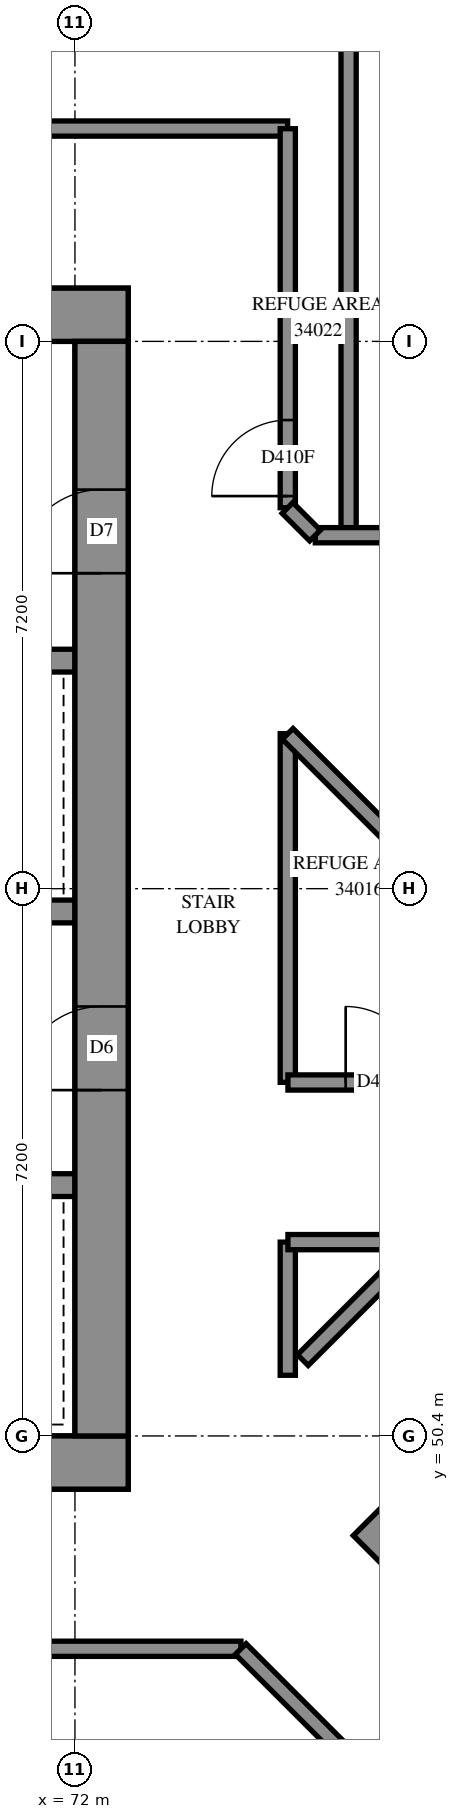
"""IFC4 building model, lengths in metres.
Left out: names, types, materials, properties, quantities, classifications, styles, units other than length and angle.
Written with IfcOpenShell. Run it as: python <this file> out.ifc"""

import sys

from ifc_helpers import new_model, si_unit, direction, frame, frame_2d, origin, place, context, subcontext, project, spatial, rectangle, extrude, element, fill, save


model = new_model("IFC4")
c1 = context("Model", 3, precision=1e-05, world=origin(), true_north=direction((0.0, 1.0)))
c2 = subcontext(c1, "Body", "Model", "MODEL_VIEW")
j1 = project(units=[si_unit("LENGTHUNIT", "METRE"), si_unit("PLANEANGLEUNIT", "RADIAN")], contexts=[c1])
p1 = place(None, origin())
s1 = spatial("IfcSite", under=j1, at=p1, CompositionType="ELEMENT")
p2 = place(p1, origin())
s2 = spatial("IfcBuilding", under=s1, at=p2, CompositionType="ELEMENT")
p3 = place(p2, frame((0.0, 0.0, 126.2)))
s3 = spatial("IfcBuildingStorey", under=s2, at=p3, CompositionType="ELEMENT", Elevation=126.2)
p4 = place(p3, frame((56.9, 50.05, -0.3), z_axis=(0.0, 0.0, 1.0), x_axis=(1.0, 0.0, 0.0)))
e1 = element("IfcWall", 1, at=p4, inside=s3, PredefinedType="SHEAR", context=c2, shape_type="SweptSolid", body=[
    extrude(rectangle(XDim=15.8, YDim=0.7, at=frame_2d((7.9, 0.0))), origin(), (0.0, 0.0, 1.0), 4.3),
])
p5 = place(p3, frame((56.9, 65.15, -0.3), z_axis=(0.0, 0.0, 1.0), x_axis=(1.0, 0.0, 0.0)))
e2 = element("IfcWall", 2, at=p5, inside=s3, PredefinedType="SHEAR", context=c2, shape_type="SweptSolid", body=[
    extrude(rectangle(XDim=15.8, YDim=0.7, at=frame_2d((7.9, 0.0))), origin(), (0.0, 0.0, 1.0), 4.3),
])
p6 = place(p5, frame((10.7, 0.0, 0.3)))
e3 = element("IfcOpeningElement", 3, at=p6, cuts=e2, PredefinedType="OPENING", context=c2, shape_type="SweptSolid", body=[
    extrude(rectangle(XDim=0.8, YDim=2.1, at=frame_2d((0.4, 1.05))), frame((0.0, 0.36, 0.0), z_axis=(0.0, -1.0, 0.0), x_axis=(1.0, 0.0, 0.0)), (0.0, 0.0, 1.0), 0.72),
])
p7 = place(p3, frame((72.35, 50.4, -0.3), z_axis=(0.0, 0.0, 1.0), x_axis=(0.0, 1.0, 0.0)))
e4 = element("IfcWall", 4, at=p7, inside=s3, PredefinedType="SHEAR", context=c2, shape_type="SweptSolid", body=[
    extrude(rectangle(XDim=14.4, YDim=0.7, at=frame_2d((7.2, 0.0))), origin(), (0.0, 0.0, 1.0), 4.3),
])
p8 = place(p7, frame((4.55, 0.0, 0.3)))
e5 = element("IfcOpeningElement", 5, at=p8, cuts=e4, PredefinedType="OPENING", context=c2, shape_type="SweptSolid", body=[
    extrude(rectangle(XDim=1.1, YDim=2.1, at=frame_2d((0.55, 1.05))), frame((0.0, 0.36, 0.0), z_axis=(0.0, -1.0, 0.0), x_axis=(1.0, 0.0, 0.0)), (0.0, 0.0, 1.0), 0.72),
])
p9 = place(p7, frame((11.35, 0.0, 0.3)))
e6 = element("IfcOpeningElement", 6, at=p9, cuts=e4, PredefinedType="OPENING", context=c2, shape_type="SweptSolid", body=[
    extrude(rectangle(XDim=1.1, YDim=2.1, at=frame_2d((0.55, 1.05))), frame((0.0, 0.36, 0.0), z_axis=(0.0, -1.0, 0.0), x_axis=(1.0, 0.0, 0.0)), (0.0, 0.0, 1.0), 0.72),
])
p10 = place(p3, frame((57.6, 53.7, 0.0), z_axis=(0.0, 0.0, 1.0), x_axis=(1.0, 0.0, 0.0)))
e7 = element("IfcWall", 7, at=p10, inside=s3, PredefinedType="SOLIDWALL", context=c2, shape_type="SweptSolid", body=[
    extrude(rectangle(XDim=14.4, YDim=0.3, at=frame_2d((7.2, 0.0))), origin(), (0.0, 0.0, 1.0), 4.7),
])
p11 = place(p10, frame((1.25, 0.0, 0.0)))
e8 = element("IfcOpeningElement", 8, at=p11, cuts=e7, PredefinedType="OPENING", context=c2, shape_type="SweptSolid", body=[
    extrude(rectangle(XDim=1.1, YDim=2.1, at=frame_2d((0.55, 1.05))), frame((0.0, 0.16, 0.0), z_axis=(0.0, -1.0, 0.0), x_axis=(1.0, 0.0, 0.0)), (0.0, 0.0, 1.0), 0.32),
])
p12 = place(p10, frame((4.85, 0.0, 0.0)))
e9 = element("IfcOpeningElement", 9, at=p12, cuts=e7, PredefinedType="OPENING", context=c2, shape_type="SweptSolid", body=[
    extrude(rectangle(XDim=1.1, YDim=2.1, at=frame_2d((0.55, 1.05))), frame((0.0, 0.16, 0.0), z_axis=(0.0, -1.0, 0.0), x_axis=(1.0, 0.0, 0.0)), (0.0, 0.0, 1.0), 0.32),
])
p13 = place(p10, frame((8.45, 0.0, 0.0)))
e10 = element("IfcOpeningElement", 10, at=p13, cuts=e7, PredefinedType="OPENING", context=c2, shape_type="SweptSolid", body=[
    extrude(rectangle(XDim=1.1, YDim=2.1, at=frame_2d((0.55, 1.05))), frame((0.0, 0.16, 0.0), z_axis=(0.0, -1.0, 0.0), x_axis=(1.0, 0.0, 0.0)), (0.0, 0.0, 1.0), 0.32),
])
p14 = place(p10, frame((12.05, 0.0, 0.0)))
e11 = element("IfcOpeningElement", 11, at=p14, cuts=e7, PredefinedType="OPENING", context=c2, shape_type="SweptSolid", body=[
    extrude(rectangle(XDim=1.1, YDim=2.1, at=frame_2d((0.55, 1.05))), frame((0.0, 0.16, 0.0), z_axis=(0.0, -1.0, 0.0), x_axis=(1.0, 0.0, 0.0)), (0.0, 0.0, 1.0), 0.32),
])
p15 = place(p3, frame((57.6, 57.3, 0.0), z_axis=(0.0, 0.0, 1.0), x_axis=(1.0, 0.0, 0.0)))
e12 = element("IfcWall", 12, at=p15, inside=s3, PredefinedType="SOLIDWALL", context=c2, shape_type="SweptSolid", body=[
    extrude(rectangle(XDim=14.4, YDim=0.3, at=frame_2d((7.2, 0.0))), origin(), (0.0, 0.0, 1.0), 4.7),
])
p16 = place(p15, frame((12.05, 0.0, 0.0)))
e13 = element("IfcOpeningElement", 13, at=p16, cuts=e12, PredefinedType="OPENING", context=c2, shape_type="SweptSolid", body=[
    extrude(rectangle(XDim=1.1, YDim=2.1, at=frame_2d((0.55, 1.05))), frame((0.0, 0.16, 0.0), z_axis=(0.0, -1.0, 0.0), x_axis=(1.0, 0.0, 0.0)), (0.0, 0.0, 1.0), 0.32),
])
p17 = place(p3, frame((64.8, 60.6, 0.0), z_axis=(0.0, 0.0, 1.0), x_axis=(1.0, 0.0, 0.0)))
e14 = element("IfcWall", 14, at=p17, inside=s3, PredefinedType="SOLIDWALL", context=c2, shape_type="SweptSolid", body=[
    extrude(rectangle(XDim=7.2, YDim=0.3, at=frame_2d((3.6, 0.0))), origin(), (0.0, 0.0, 1.0), 4.7),
])
p18 = place(p3, frame((75.912, 49.337, -0.3), z_axis=(0.0, 0.0, 1.0), x_axis=(0.7071036166, -0.7071099457, 0.0)))
e15 = element("IfcWall", 15, at=p18, inside=s3, PredefinedType="SHEAR", context=c2, shape_type="SweptSolid", body=[
    extrude(rectangle(XDim=15.8, YDim=0.7, at=frame_2d((7.9, 0.0))), origin(), (0.0, 0.0, 1.0), 4.3),
])
p19 = place(p3, frame((54.8, 67.6, 0.0), z_axis=(0.0, 0.0, 1.0), x_axis=(1.0, 0.0, 0.0)))
e16 = element("IfcWall", 16, at=p19, inside=s3, PredefinedType="PARTITIONING", context=c2, shape_type="SweptSolid", body=[
    extrude(rectangle(XDim=19.998, YDim=0.2, at=frame_2d((9.999, 0.0))), origin(), (0.0, 0.0, 1.0), 4.7),
])
p20 = place(p19, frame((8.738, 0.0, 0.0)))
e17 = element("IfcOpeningElement", 17, at=p20, cuts=e16, PredefinedType="OPENING", context=c2, shape_type="SweptSolid", body=[
    extrude(rectangle(XDim=1.0, YDim=2.1, at=frame_2d((0.5, 1.05))), frame((0.0, 0.11, 0.0), z_axis=(0.0, -1.0, 0.0), x_axis=(1.0, 0.0, 0.0)), (0.0, 0.0, 1.0), 0.22),
])
p21 = place(p3, frame((54.8, 47.6, 0.0), z_axis=(0.0, 0.0, 1.0), x_axis=(1.0, 0.0, 0.0)))
e18 = element("IfcWall", 18, at=p21, inside=s3, PredefinedType="PARTITIONING", context=c2, shape_type="SweptSolid", body=[
    extrude(rectangle(XDim=19.384, YDim=0.2, at=frame_2d((9.692, 0.0))), origin(), (0.0, 0.0, 1.0), 4.7),
])
p22 = place(p21, frame((12.156, 0.0, 0.0)))
e19 = element("IfcOpeningElement", 19, at=p22, cuts=e18, PredefinedType="OPENING", context=c2, shape_type="SweptSolid", body=[
    extrude(rectangle(XDim=1.0, YDim=2.1, at=frame_2d((0.5, 1.05))), frame((0.0, 0.11, 0.0), z_axis=(0.0, -1.0, 0.0), x_axis=(1.0, 0.0, 0.0)), (0.0, 0.0, 1.0), 0.22),
])
p23 = place(p3, frame((75.6, 62.25, 0.0), z_axis=(0.0, 0.0, 1.0), x_axis=(0.0, 1.0, 0.0)))
e20 = element("IfcWall", 20, at=p23, inside=s3, PredefinedType="PARTITIONING", context=c2, shape_type="SweptSolid", body=[
    extrude(rectangle(XDim=6.8, YDim=0.2, at=frame_2d((3.4, 0.0))), origin(), (0.0, 0.0, 1.0), 4.7),
])
p24 = place(p3, frame((74.8, 62.612, 0.0), z_axis=(0.0, 0.0, 1.0), x_axis=(0.0, 1.0, 0.0)))
e21 = element("IfcWall", 21, at=p24, inside=s3, PredefinedType="PARTITIONING", context=c2, shape_type="SweptSolid", body=[
    extrude(rectangle(XDim=4.986, YDim=0.2, at=frame_2d((2.493, 0.0))), origin(), (0.0, 0.0, 1.0), 4.7),
])
p25 = place(p24, frame((0.153, 0.0, 0.0)))
e22 = element("IfcOpeningElement", 22, at=p25, cuts=e21, PredefinedType="OPENING", context=c2, shape_type="SweptSolid", body=[
    extrude(rectangle(XDim=1.0, YDim=2.1, at=frame_2d((0.5, 1.05))), frame((0.0, 0.11, 0.0), z_axis=(0.0, -1.0, 0.0), x_axis=(1.0, 0.0, 0.0)), (0.0, 0.0, 1.0), 0.22),
])
p26 = place(p3, frame((74.8, 55.052, 0.0), z_axis=(0.0, 0.0, 1.0), x_axis=(0.0, 1.0, 0.0)))
e23 = element("IfcWall", 23, at=p26, inside=s3, PredefinedType="PARTITIONING", context=c2, shape_type="SweptSolid", body=[
    extrude(rectangle(XDim=4.588, YDim=0.2, at=frame_2d((2.294, 0.0))), origin(), (0.0, 0.0, 1.0), 4.7),
])
p27 = place(p3, frame((75.162, 62.25, 0.0), z_axis=(0.0, 0.0, 1.0), x_axis=(1.0, 0.0, 0.0)))
e24 = element("IfcWall", 24, at=p27, inside=s3, PredefinedType="PARTITIONING", context=c2, shape_type="SweptSolid", body=[
    extrude(rectangle(XDim=4.038, YDim=0.2, at=frame_2d((2.019, 0.0))), origin(), (0.0, 0.0, 1.0), 4.7),
])
p28 = place(p3, frame((74.802, 55.05, 0.0), z_axis=(0.0, 0.0, 1.0), x_axis=(1.0, 0.0, 0.0)))
e25 = element("IfcWall", 25, at=p28, inside=s3, PredefinedType="PARTITIONING", context=c2, shape_type="SweptSolid", body=[
    extrude(rectangle(XDim=3.852, YDim=0.2, at=frame_2d((1.926, 0.0))), origin(), (0.0, 0.0, 1.0), 4.7),
])
p29 = place(p28, frame((0.759, 0.0, 0.0)))
e26 = element("IfcOpeningElement", 26, at=p29, cuts=e25, PredefinedType="OPENING", context=c2, shape_type="SweptSolid", body=[
    extrude(rectangle(XDim=1.0, YDim=2.1, at=frame_2d((0.5, 1.05))), frame((0.0, 0.11, 0.0), z_axis=(0.0, -1.0, 0.0), x_axis=(1.0, 0.0, 0.0)), (0.0, 0.0, 1.0), 0.22),
])
p30 = place(p3, frame((74.799, 59.637, 0.0), z_axis=(0.0, 0.0, 1.0), x_axis=(0.7071067812, -0.7071067812, 0.0)))
e27 = element("IfcWall", 27, at=p30, inside=s3, PredefinedType="PARTITIONING", context=c2, shape_type="SweptSolid", body=[
    extrude(rectangle(XDim=3.745, YDim=0.2, at=frame_2d((1.872, 0.0))), origin(), (0.0, 0.0, 1.0), 4.7),
])
p31 = place(p3, frame((74.998, 51.398, 0.0), z_axis=(0.0, 0.0, 1.0), x_axis=(0.7075619512, 0.706651318, 0.0)))
e28 = element("IfcWall", 28, at=p31, inside=s3, PredefinedType="PARTITIONING", context=c2, shape_type="SweptSolid", body=[
    extrude(rectangle(XDim=2.196, YDim=0.2, at=frame_2d((1.098, 0.0))), origin(), (0.0, 0.0, 1.0), 4.7),
])
p32 = place(p3, frame((74.181, 47.597, 0.0), z_axis=(0.0, 0.0, 1.0), x_axis=(0.7070823464, -0.7071312152, 0.0)))
e29 = element("IfcWall", 29, at=p32, inside=s3, PredefinedType="PARTITIONING", context=c2, shape_type="SweptSolid", body=[
    extrude(rectangle(XDim=2.046, YDim=0.2, at=frame_2d((1.023, 0.0))), origin(), (0.0, 0.0, 1.0), 4.7),
])
p33 = place(p3, frame((74.8, 51.198, 0.0), z_axis=(0.0, 0.0, 1.0), x_axis=(0.0, 1.0, 0.0)))
e30 = element("IfcWall", 30, at=p33, inside=s3, PredefinedType="PARTITIONING", context=c2, shape_type="SweptSolid", body=[
    extrude(rectangle(XDim=1.752, YDim=0.2, at=frame_2d((0.876, 0.0))), origin(), (0.0, 0.0, 1.0), 4.7),
])
p34 = place(p3, frame((74.802, 52.95, 0.0), z_axis=(0.0, 0.0, 1.0), x_axis=(1.0, 0.0, 0.0)))
e31 = element("IfcWall", 31, at=p34, inside=s3, PredefinedType="PARTITIONING", context=c2, shape_type="SweptSolid", body=[
    extrude(rectangle(XDim=1.75, YDim=0.2, at=frame_2d((0.875, 0.0))), origin(), (0.0, 0.0, 1.0), 4.7),
])
p35 = place(p3, frame((74.796, 62.608, 0.0), z_axis=(0.0, 0.0, 1.0), x_axis=(0.7071067812, -0.7071067812, 0.0)))
e32 = element("IfcWall", 32, at=p35, inside=s3, PredefinedType="PARTITIONING", context=c2, shape_type="SweptSolid", body=[
    extrude(rectangle(XDim=0.512, YDim=0.2, at=frame_2d((0.256, 0.0))), origin(), (0.0, 0.0, 1.0), 4.7),
])
p36 = place(p8, origin())
e33 = element("IfcDoor", 33, at=p36, inside=s3, OperationType="DOUBLE_DOOR_SINGLE_SWING", PredefinedType="DOOR", context=c2, shape_type="SweptSolid", body=[
    extrude(rectangle(XDim=1.1, YDim=2.1, at=frame_2d((0.55, 1.05))), frame((0.0, 0.025, 0.0), z_axis=(0.0, -1.0, 0.0), x_axis=(1.0, 0.0, 0.0)), (0.0, 0.0, 1.0), 0.05),
])
fill(e5, e33)
p37 = place(p9, origin())
e34 = element("IfcDoor", 34, at=p37, inside=s3, OperationType="SINGLE_SWING_RIGHT", PredefinedType="DOOR", context=c2, shape_type="SweptSolid", body=[
    extrude(rectangle(XDim=1.1, YDim=2.1, at=frame_2d((0.55, 1.05))), frame((0.0, 0.025, 0.0), z_axis=(0.0, -1.0, 0.0), x_axis=(1.0, 0.0, 0.0)), (0.0, 0.0, 1.0), 0.05),
])
fill(e6, e34)
p38 = place(p29, origin())
e35 = element("IfcDoor", 35, at=p38, inside=s3, OperationType="SINGLE_SWING_LEFT", PredefinedType="DOOR", context=c2, shape_type="SweptSolid", body=[
    extrude(rectangle(XDim=1.0, YDim=2.1, at=frame_2d((0.5, 1.05))), frame((0.0, 0.025, 0.0), z_axis=(0.0, -1.0, 0.0), x_axis=(1.0, 0.0, 0.0)), (0.0, 0.0, 1.0), 0.05),
])
fill(e26, e35)
p39 = place(p25, origin())
e36 = element("IfcDoor", 36, at=p39, inside=s3, OperationType="SINGLE_SWING_LEFT", PredefinedType="DOOR", context=c2, shape_type="SweptSolid", body=[
    extrude(rectangle(XDim=1.0, YDim=2.1, at=frame_2d((0.5, 1.05))), frame((0.0, 0.025, 0.0), z_axis=(0.0, -1.0, 0.0), x_axis=(1.0, 0.0, 0.0)), (0.0, 0.0, 1.0), 0.05),
])
fill(e22, e36)
save(model, sys.argv[1])
